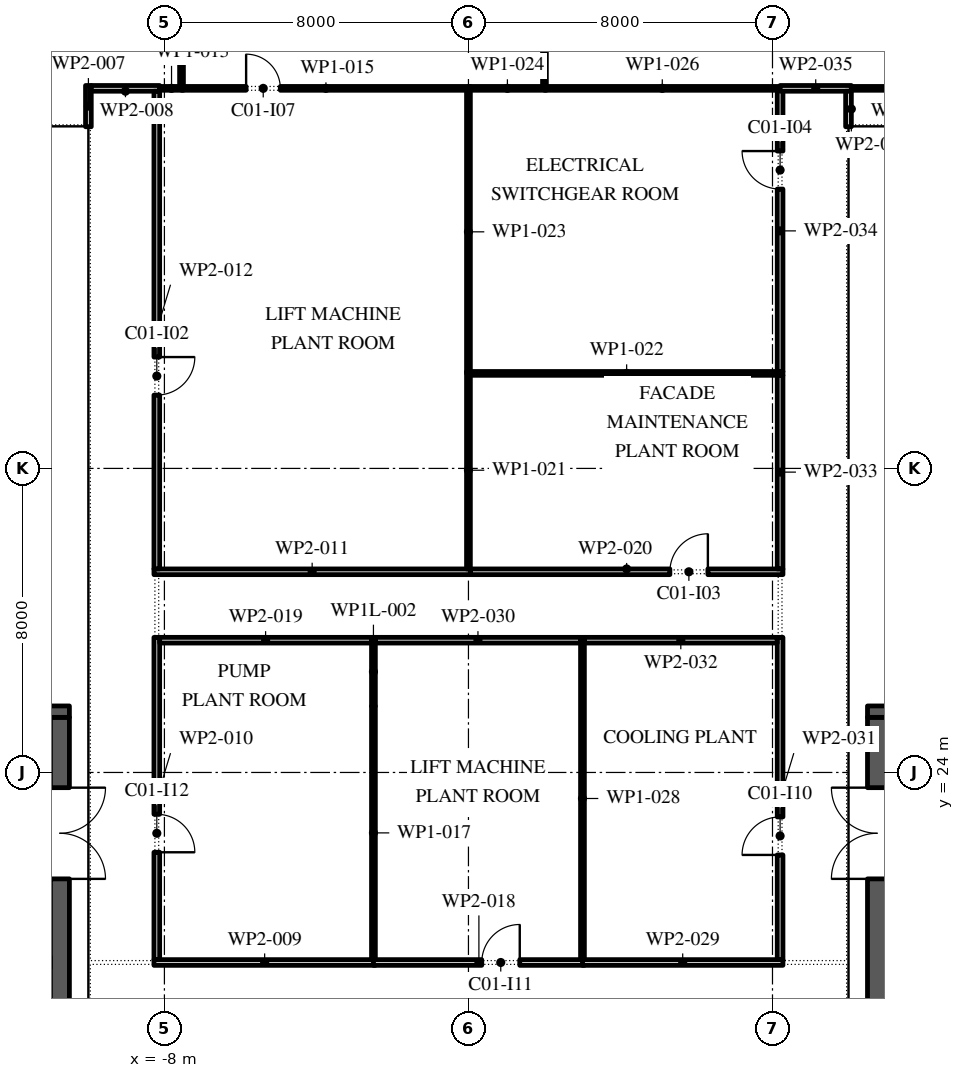
"""IFC4 building model, lengths in metres.
Left out: names, types, materials, properties, quantities, classifications, styles, units other than length and angle.
Written with IfcOpenShell. Run it as: python <this file> out.ifc"""

import sys

from ifc_helpers import new_model, si_unit, direction, frame, frame_2d, origin, place, context, subcontext, project, spatial, rectangle, extrude, element, fill, save


model = new_model("IFC4")
c1 = context("Model", 3, precision=1e-05, world=origin(), true_north=direction((0.0, 1.0)))
c2 = subcontext(c1, "Body", "Model", "MODEL_VIEW")
j1 = project(units=[si_unit("LENGTHUNIT", "METRE"), si_unit("PLANEANGLEUNIT", "RADIAN")], contexts=[c1])
p1 = place(None, origin())
s1 = spatial("IfcSite", under=j1, at=p1, CompositionType="ELEMENT")
p2 = place(p1, origin())
s2 = spatial("IfcBuilding", under=s1, at=p2, CompositionType="ELEMENT")
p3 = place(p2, frame((0.0, 0.0, 369.0)))
s3 = spatial("IfcBuildingStorey", under=s2, at=p3, CompositionType="ELEMENT", Elevation=369.0)
p4 = place(p3, frame((-10.75, -2.45, 0.0), z_axis=(0.0, 0.0, 1.0), x_axis=(0.0, 1.0, 0.0)))
e1 = element("IfcWall", 1, at=p4, inside=s3, PredefinedType="SHEAR", context=c2, shape_type="SweptSolid", body=[
    extrude(rectangle(XDim=27.9, YDim=0.5, at=frame_2d((13.95, 0.0))), origin(), (0.0, 0.0, 1.0), 4.0),
])
p5 = place(p4, frame((23.65, 0.0, 0.0)))
e2 = element("IfcOpeningElement", 2, at=p5, cuts=e1, PredefinedType="OPENING", context=c2, shape_type="SweptSolid", body=[
    extrude(rectangle(XDim=2.4, YDim=2.1, at=frame_2d((1.2, 1.05))), frame((0.0, 0.26, 0.0), z_axis=(0.0, -1.0, 0.0), x_axis=(1.0, 0.0, 0.0)), (0.0, 0.0, 1.0), 0.52),
])
p6 = place(p4, frame((1.387, 0.0, 0.0)))
e3 = element("IfcOpeningElement", 3, at=p6, cuts=e1, PredefinedType="OPENING", context=c2, shape_type="SweptSolid", body=[
    extrude(rectangle(XDim=0.9, YDim=2.1, at=frame_2d((0.45, 1.05))), frame((0.0, 0.26, 0.0), z_axis=(0.0, -1.0, 0.0), x_axis=(1.0, 0.0, 0.0)), (0.0, 0.0, 1.0), 0.52),
])
p7 = place(p4, frame((4.562, 0.0, 0.0)))
e4 = element("IfcOpeningElement", 4, at=p7, cuts=e1, PredefinedType="OPENING", context=c2, shape_type="SweptSolid", body=[
    extrude(rectangle(XDim=1.0, YDim=2.1, at=frame_2d((0.5, 1.05))), frame((0.0, 0.26, 0.0), z_axis=(0.0, -1.0, 0.0), x_axis=(1.0, 0.0, 0.0)), (0.0, 0.0, 1.0), 0.52),
])
p8 = place(p3, frame((-21.5, 25.6, 0.0), z_axis=(0.0, 0.0, 1.0), x_axis=(1.0, 0.0, 0.0)))
e5 = element("IfcWall", 5, at=p8, inside=s3, PredefinedType="SHEAR", context=c2, shape_type="SweptSolid", body=[
    extrude(rectangle(XDim=11.0, YDim=0.3, at=frame_2d((5.5, 0.0))), origin(), (0.0, 0.0, 1.0), 4.0),
])
p9 = place(p3, frame((10.75, -2.45, 0.0), z_axis=(0.0, 0.0, 1.0), x_axis=(0.0, 1.0, 0.0)))
e6 = element("IfcWall", 6, at=p9, inside=s3, PredefinedType="SHEAR", context=c2, shape_type="SweptSolid", body=[
    extrude(rectangle(XDim=27.9, YDim=0.5, at=frame_2d((13.95, 0.0))), origin(), (0.0, 0.0, 1.0), 4.0),
])
p10 = place(p9, frame((23.65, 0.0, 0.0)))
e7 = element("IfcOpeningElement", 7, at=p10, cuts=e6, PredefinedType="OPENING", context=c2, shape_type="SweptSolid", body=[
    extrude(rectangle(XDim=2.4, YDim=2.1, at=frame_2d((1.2, 1.05))), frame((0.0, 0.26, 0.0), z_axis=(0.0, -1.0, 0.0), x_axis=(1.0, 0.0, 0.0)), (0.0, 0.0, 1.0), 0.52),
])
p11 = place(p9, frame((0.788, 0.0, 0.0)))
e8 = element("IfcOpeningElement", 8, at=p11, cuts=e6, PredefinedType="OPENING", context=c2, shape_type="SweptSolid", body=[
    extrude(rectangle(XDim=0.9, YDim=2.1, at=frame_2d((0.45, 1.05))), frame((0.0, 0.26, 0.0), z_axis=(0.0, -1.0, 0.0), x_axis=(1.0, 0.0, 0.0)), (0.0, 0.0, 1.0), 0.52),
])
p12 = place(p9, frame((3.962, 0.0, 0.0)))
e9 = element("IfcOpeningElement", 9, at=p12, cuts=e6, PredefinedType="OPENING", context=c2, shape_type="SweptSolid", body=[
    extrude(rectangle(XDim=1.0, YDim=2.1, at=frame_2d((0.5, 1.05))), frame((0.0, 0.26, 0.0), z_axis=(0.0, -1.0, 0.0), x_axis=(1.0, 0.0, 0.0)), (0.0, 0.0, 1.0), 0.52),
])
p13 = place(p3, frame((10.5, 25.6, 0.0), z_axis=(0.0, 0.0, 1.0), x_axis=(1.0, 0.0, 0.0)))
e10 = element("IfcWall", 10, at=p13, inside=s3, PredefinedType="SHEAR", context=c2, shape_type="SweptSolid", body=[
    extrude(rectangle(XDim=11.0, YDim=0.3, at=frame_2d((5.5, 0.0))), origin(), (0.0, 0.0, 1.0), 4.0),
])
p14 = place(p3, frame((-10.0, 40.99, 0.0), z_axis=(0.0, 0.0, 1.0), x_axis=(0.0, 1.0, 0.0)))
e11 = element("IfcWall", 11, at=p14, inside=s3, PredefinedType="PARTITIONING", context=c2, shape_type="SweptSolid", body=[
    extrude(rectangle(XDim=1.085, YDim=0.15, at=frame_2d((0.542, 0.0))), origin(), (0.0, 0.0, 1.0), 4.0),
])
p15 = place(p3, frame((-9.925, 42.0, 0.0), z_axis=(0.0, 0.0, 1.0), x_axis=(1.0, 0.0, 0.0)))
e12 = element("IfcWall", 12, at=p15, inside=s3, PredefinedType="PARTITIONING", context=c2, shape_type="SweptSolid", body=[
    extrude(rectangle(XDim=1.8, YDim=0.15, at=frame_2d((0.9, 0.0))), origin(), (0.0, 0.0, 1.0), 4.0),
])
p16 = place(p3, frame((-8.275, 19.0, 0.0), z_axis=(0.0, 0.0, 1.0), x_axis=(1.0, 0.0, 0.0)))
e13 = element("IfcWall", 13, at=p16, inside=s3, PredefinedType="PARTITIONING", context=c2, shape_type="SweptSolid", body=[
    extrude(rectangle(XDim=5.825, YDim=0.15, at=frame_2d((2.913, 0.0))), origin(), (0.0, 0.0, 1.0), 4.0),
])
p17 = place(p3, frame((-8.2, 27.555, 0.0), z_axis=(0.0, 0.0, 1.0), x_axis=(0.0, -1.0, 0.0)))
e14 = element("IfcWall", 14, at=p17, inside=s3, PredefinedType="PARTITIONING", context=c2, shape_type="SweptSolid", body=[
    extrude(rectangle(XDim=8.48, YDim=0.15, at=frame_2d((4.24, 0.0))), origin(), (0.0, 0.0, 1.0), 4.0),
])
p18 = place(p17, frame((4.655, 0.0, 0.0)))
e15 = element("IfcOpeningElement", 15, at=p18, cuts=e14, PredefinedType="OPENING", context=c2, shape_type="SweptSolid", body=[
    extrude(rectangle(XDim=1.0, YDim=2.1, at=frame_2d((0.5, 1.05))), frame((0.0, 0.085, 0.0), z_axis=(0.0, -1.0, 0.0), x_axis=(1.0, 0.0, 0.0)), (0.0, 0.0, 1.0), 0.17),
])
p19 = place(p3, frame((-8.275, 29.28, 0.0), z_axis=(0.0, 0.0, 1.0), x_axis=(1.0, 0.0, 0.0)))
e16 = element("IfcWall", 16, at=p19, inside=s3, PredefinedType="PARTITIONING", context=c2, shape_type="SweptSolid", body=[
    extrude(rectangle(XDim=8.325, YDim=0.15, at=frame_2d((4.163, 0.0))), origin(), (0.0, 0.0, 1.0), 4.0),
])
p20 = place(p3, frame((-8.2, 41.925, 0.0), z_axis=(0.0, 0.0, 1.0), x_axis=(0.0, -1.0, 0.0)))
e17 = element("IfcWall", 17, at=p20, inside=s3, PredefinedType="PARTITIONING", context=c2, shape_type="SweptSolid", body=[
    extrude(rectangle(XDim=12.57, YDim=0.15, at=frame_2d((6.285, 0.0))), origin(), (0.0, 0.0, 1.0), 4.0),
])
p21 = place(p20, frame((6.995, 0.0, 0.0)))
e18 = element("IfcOpeningElement", 18, at=p21, cuts=e17, PredefinedType="OPENING", context=c2, shape_type="SweptSolid", body=[
    extrude(rectangle(XDim=1.0, YDim=2.1, at=frame_2d((0.5, 1.05))), frame((0.0, 0.085, 0.0), z_axis=(0.0, -1.0, 0.0), x_axis=(1.0, 0.0, 0.0)), (0.0, 0.0, 1.0), 0.17),
])
p22 = place(p3, frame((-8.125, 42.0, 0.0), z_axis=(0.0, 0.0, 1.0), x_axis=(1.0, 0.0, 0.0)))
e19 = element("IfcWall", 19, at=p22, inside=s3, PredefinedType="PARTITIONING", context=c2, shape_type="SweptSolid", body=[
    extrude(rectangle(XDim=0.625, YDim=0.1, at=frame_2d((0.312, 0.0))), origin(), (0.0, 0.0, 1.0), 4.0),
])
p23 = place(p3, frame((-7.55, 42.05, 0.0), z_axis=(0.0, 0.0, 1.0), x_axis=(0.0, 1.0, 0.0)))
e20 = element("IfcWall", 20, at=p23, inside=s3, PredefinedType="PARTITIONING", context=c2, shape_type="SweptSolid", body=[
    extrude(rectangle(XDim=7.4, YDim=0.1, at=frame_2d((3.7, 0.0))), origin(), (0.0, 0.0, 1.0), 4.0),
])
p24 = place(p3, frame((-7.55, 42.0, 0.0), z_axis=(0.0, 0.0, 1.0), x_axis=(1.0, 0.0, 0.0)))
e21 = element("IfcWall", 21, at=p24, inside=s3, PredefinedType="PARTITIONING", context=c2, shape_type="SweptSolid", body=[
    extrude(rectangle(XDim=7.6, YDim=0.1, at=frame_2d((3.8, 0.0))), origin(), (0.0, 0.0, 1.0), 4.0),
])
p25 = place(p24, frame((1.7, 0.0, 0.0)))
e22 = element("IfcOpeningElement", 22, at=p25, cuts=e21, PredefinedType="OPENING", context=c2, shape_type="SweptSolid", body=[
    extrude(rectangle(XDim=0.9, YDim=2.1, at=frame_2d((0.45, 1.05))), frame((0.0, 0.06, 0.0), z_axis=(0.0, -1.0, 0.0), x_axis=(1.0, 0.0, 0.0)), (0.0, 0.0, 1.0), 0.12),
])
p26 = place(p3, frame((-2.5, 19.075, 0.0), z_axis=(0.0, 0.0, 1.0), x_axis=(0.0, 1.0, 0.0)))
e23 = element("IfcWall", 23, at=p26, inside=s3, PredefinedType="PARTITIONING", context=c2, shape_type="SweptSolid", body=[
    extrude(rectangle(XDim=6.67, YDim=0.1, at=frame_2d((3.335, 0.0))), origin(), (0.0, 0.0, 1.0), 4.0),
])
p27 = place(p3, frame((-2.5, 19.0, 0.0), z_axis=(0.0, 0.0, 1.0), x_axis=(1.0, 0.0, 0.0)))
e24 = element("IfcWall", 24, at=p27, inside=s3, PredefinedType="PARTITIONING", context=c2, shape_type="SweptSolid", body=[
    extrude(rectangle(XDim=5.55, YDim=0.15, at=frame_2d((2.775, 0.0))), origin(), (0.0, 0.0, 1.0), 4.0),
])
p28 = place(p27, frame((2.85, 0.0, 0.0)))
e25 = element("IfcOpeningElement", 25, at=p28, cuts=e24, PredefinedType="OPENING", context=c2, shape_type="SweptSolid", body=[
    extrude(rectangle(XDim=1.0, YDim=2.1, at=frame_2d((0.5, 1.05))), frame((0.0, 0.085, 0.0), z_axis=(0.0, -1.0, 0.0), x_axis=(1.0, 0.0, 0.0)), (0.0, 0.0, 1.0), 0.17),
])
p29 = place(p3, frame((-2.55, 27.48, 0.0), z_axis=(0.0, 0.0, 1.0), x_axis=(-1.0, 0.0, 0.0)))
e26 = element("IfcWall", 26, at=p29, inside=s3, PredefinedType="PARTITIONING", context=c2, shape_type="SweptSolid", body=[
    extrude(rectangle(XDim=5.575, YDim=0.15, at=frame_2d((2.788, 0.0))), origin(), (0.0, 0.0, 1.0), 4.0),
])
p30 = place(p3, frame((0.05, 29.28, 0.0), z_axis=(0.0, 0.0, 1.0), x_axis=(1.0, 0.0, 0.0)))
e27 = element("IfcWall", 27, at=p30, inside=s3, PredefinedType="PARTITIONING", context=c2, shape_type="SweptSolid", body=[
    extrude(rectangle(XDim=8.225, YDim=0.15, at=frame_2d((4.112, 0.0))), origin(), (0.0, 0.0, 1.0), 4.0),
])
p31 = place(p30, frame((5.25, 0.0, 0.0)))
e28 = element("IfcOpeningElement", 28, at=p31, cuts=e27, PredefinedType="OPENING", context=c2, shape_type="SweptSolid", body=[
    extrude(rectangle(XDim=1.0, YDim=2.1, at=frame_2d((0.5, 1.05))), frame((0.0, 0.085, 0.0), z_axis=(0.0, -1.0, 0.0), x_axis=(1.0, 0.0, 0.0)), (0.0, 0.0, 1.0), 0.17),
])
p32 = place(p3, frame((0.0, 34.55, 0.0), z_axis=(0.0, 0.0, 1.0), x_axis=(0.0, -1.0, 0.0)))
e29 = element("IfcWall", 29, at=p32, inside=s3, PredefinedType="PARTITIONING", context=c2, shape_type="SweptSolid", body=[
    extrude(rectangle(XDim=5.195, YDim=0.1, at=frame_2d((2.598, 0.0))), origin(), (0.0, 0.0, 1.0), 4.0),
])
p33 = place(p3, frame((0.05, 34.5, 0.0), z_axis=(0.0, 0.0, 1.0), x_axis=(1.0, 0.0, 0.0)))
e30 = element("IfcWall", 30, at=p33, inside=s3, PredefinedType="PARTITIONING", context=c2, shape_type="SweptSolid", body=[
    extrude(rectangle(XDim=8.225, YDim=0.1, at=frame_2d((4.112, 0.0))), origin(), (0.0, 0.0, 1.0), 4.0),
])
p34 = place(p3, frame((0.0, 41.95, 0.0), z_axis=(0.0, 0.0, 1.0), x_axis=(0.0, -1.0, 0.0)))
e31 = element("IfcWall", 31, at=p34, inside=s3, PredefinedType="PARTITIONING", context=c2, shape_type="SweptSolid", body=[
    extrude(rectangle(XDim=7.45, YDim=0.1, at=frame_2d((3.725, 0.0))), origin(), (0.0, 0.0, 1.0), 4.0),
])
p35 = place(p3, frame((0.0, 42.0, 0.0), z_axis=(0.0, 0.0, 1.0), x_axis=(1.0, 0.0, 0.0)))
e32 = element("IfcWall", 32, at=p35, inside=s3, PredefinedType="PARTITIONING", context=c2, shape_type="SweptSolid", body=[
    extrude(rectangle(XDim=2.05, YDim=0.1, at=frame_2d((1.025, 0.0))), origin(), (0.0, 0.0, 1.0), 4.0),
])
p36 = place(p3, frame((2.0, 42.05, 0.0), z_axis=(0.0, 0.0, 1.0), x_axis=(0.0, 1.0, 0.0)))
e33 = element("IfcWall", 33, at=p36, inside=s3, PredefinedType="PARTITIONING", context=c2, shape_type="SweptSolid", body=[
    extrude(rectangle(XDim=7.4, YDim=0.1, at=frame_2d((3.7, 0.0))), origin(), (0.0, 0.0, 1.0), 4.0),
])
p37 = place(p3, frame((2.0, 42.0, 0.0), z_axis=(0.0, 0.0, 1.0), x_axis=(1.0, 0.0, 0.0)))
e34 = element("IfcWall", 34, at=p37, inside=s3, PredefinedType="PARTITIONING", context=c2, shape_type="SweptSolid", body=[
    extrude(rectangle(XDim=6.2, YDim=0.1, at=frame_2d((3.1, 0.0))), origin(), (0.0, 0.0, 1.0), 4.0),
])
p38 = place(p3, frame((3.0, 19.075, 0.0), z_axis=(0.0, 0.0, 1.0), x_axis=(0.0, 1.0, 0.0)))
e35 = element("IfcWall", 35, at=p38, inside=s3, PredefinedType="PARTITIONING", context=c2, shape_type="SweptSolid", body=[
    extrude(rectangle(XDim=8.48, YDim=0.1, at=frame_2d((4.24, 0.0))), origin(), (0.0, 0.0, 1.0), 4.0),
])
p39 = place(p3, frame((3.0, 19.0, 0.0), z_axis=(0.0, 0.0, 1.0), x_axis=(1.0, 0.0, 0.0)))
e36 = element("IfcWall", 36, at=p39, inside=s3, PredefinedType="PARTITIONING", context=c2, shape_type="SweptSolid", body=[
    extrude(rectangle(XDim=5.275, YDim=0.15, at=frame_2d((2.637, 0.0))), origin(), (0.0, 0.0, 1.0), 4.0),
])
p40 = place(p3, frame((2.95, 27.48, 0.0), z_axis=(0.0, 0.0, 1.0), x_axis=(-1.0, 0.0, 0.0)))
e37 = element("IfcWall", 37, at=p40, inside=s3, PredefinedType="PARTITIONING", context=c2, shape_type="SweptSolid", body=[
    extrude(rectangle(XDim=5.4, YDim=0.15, at=frame_2d((2.7, 0.0))), origin(), (0.0, 0.0, 1.0), 4.0),
])
p41 = place(p3, frame((8.2, 19.075, 0.0), z_axis=(0.0, 0.0, 1.0), x_axis=(0.0, 1.0, 0.0)))
e38 = element("IfcWall", 38, at=p41, inside=s3, PredefinedType="PARTITIONING", context=c2, shape_type="SweptSolid", body=[
    extrude(rectangle(XDim=8.48, YDim=0.15, at=frame_2d((4.24, 0.0))), origin(), (0.0, 0.0, 1.0), 4.0),
])
p42 = place(p41, frame((2.755, 0.0, 0.0)))
e39 = element("IfcOpeningElement", 39, at=p42, cuts=e38, PredefinedType="OPENING", context=c2, shape_type="SweptSolid", body=[
    extrude(rectangle(XDim=1.0, YDim=2.1, at=frame_2d((0.5, 1.05))), frame((0.0, 0.085, 0.0), z_axis=(0.0, -1.0, 0.0), x_axis=(1.0, 0.0, 0.0)), (0.0, 0.0, 1.0), 0.17),
])
p43 = place(p3, frame((8.125, 27.48, 0.0), z_axis=(0.0, 0.0, 1.0), x_axis=(-1.0, 0.0, 0.0)))
e40 = element("IfcWall", 40, at=p43, inside=s3, PredefinedType="PARTITIONING", context=c2, shape_type="SweptSolid", body=[
    extrude(rectangle(XDim=5.075, YDim=0.15, at=frame_2d((2.538, 0.0))), origin(), (0.0, 0.0, 1.0), 4.0),
])
p44 = place(p3, frame((8.2, 29.355, 0.0), z_axis=(0.0, 0.0, 1.0), x_axis=(0.0, 1.0, 0.0)))
e41 = element("IfcWall", 41, at=p44, inside=s3, PredefinedType="PARTITIONING", context=c2, shape_type="SweptSolid", body=[
    extrude(rectangle(XDim=5.095, YDim=0.15, at=frame_2d((2.547, 0.0))), origin(), (0.0, 0.0, 1.0), 4.0),
])
p45 = place(p3, frame((8.2, 34.55, 0.0), z_axis=(0.0, 0.0, 1.0), x_axis=(0.0, 1.0, 0.0)))
e42 = element("IfcWall", 42, at=p45, inside=s3, PredefinedType="PARTITIONING", context=c2, shape_type="SweptSolid", body=[
    extrude(rectangle(XDim=7.4, YDim=0.15, at=frame_2d((3.7, 0.0))), origin(), (0.0, 0.0, 1.0), 4.0),
])
p46 = place(p45, frame((4.8, 0.0, 0.0)))
e43 = element("IfcOpeningElement", 43, at=p46, cuts=e42, PredefinedType="OPENING", context=c2, shape_type="SweptSolid", body=[
    extrude(rectangle(XDim=1.0, YDim=2.1, at=frame_2d((0.5, 1.05))), frame((0.0, 0.085, 0.0), z_axis=(0.0, -1.0, 0.0), x_axis=(1.0, 0.0, 0.0)), (0.0, 0.0, 1.0), 0.17),
])
p47 = place(p3, frame((8.2, 42.0, 0.0), z_axis=(0.0, 0.0, 1.0), x_axis=(1.0, 0.0, 0.0)))
e44 = element("IfcWall", 44, at=p47, inside=s3, PredefinedType="PARTITIONING", context=c2, shape_type="SweptSolid", body=[
    extrude(rectangle(XDim=1.875, YDim=0.15, at=frame_2d((0.938, 0.0))), origin(), (0.0, 0.0, 1.0), 4.0),
])
p48 = place(p3, frame((10.0, 41.925, 0.0), z_axis=(0.0, 0.0, 1.0), x_axis=(0.0, -1.0, 0.0)))
e45 = element("IfcWall", 45, at=p48, inside=s3, PredefinedType="PARTITIONING", context=c2, shape_type="SweptSolid", body=[
    extrude(rectangle(XDim=0.935, YDim=0.15, at=frame_2d((0.468, 0.0))), origin(), (0.0, 0.0, 1.0), 4.0),
])
p49 = place(p3, frame((10.075, 42.0, 0.0), z_axis=(0.0, 0.0, 1.0), x_axis=(1.0, 0.0, 0.0)))
e46 = element("IfcWall", 46, at=p49, inside=s3, PredefinedType="PARTITIONING", context=c2, shape_type="SweptSolid", body=[
    extrude(rectangle(XDim=2.975, YDim=0.1, at=frame_2d((1.488, 0.0))), origin(), (0.0, 0.0, 1.0), 4.0),
])
p50 = place(p3, frame((-2.5, 25.745, 0.0), z_axis=(0.0, 0.0, 1.0), x_axis=(0.0, 1.0, 0.0)))
e47 = element("IfcWall", 47, at=p50, inside=s3, PredefinedType="PARTITIONING", context=c2, shape_type="SweptSolid", body=[
    extrude(rectangle(XDim=1.81, YDim=0.1, at=frame_2d((0.905, 0.0))), origin(), (0.0, 0.0, 1.0), 3.02),
])
p51 = place(p5, frame((2.4, 0.0, 0.0), z_axis=(0.0, 0.0, 1.0), x_axis=(-1.0, 0.0, 0.0)))
e48 = element("IfcDoor", 48, at=p51, inside=s3, OperationType="DOUBLE_DOOR_SINGLE_SWING", PredefinedType="DOOR", context=c2, shape_type="SweptSolid", body=[
    extrude(rectangle(XDim=2.4, YDim=2.1, at=frame_2d((1.2, 1.05))), frame((0.0, 0.025, 0.0), z_axis=(0.0, -1.0, 0.0), x_axis=(1.0, 0.0, 0.0)), (0.0, 0.0, 1.0), 0.05),
])
fill(e2, e48)
p52 = place(p10, origin())
e49 = element("IfcDoor", 49, at=p52, inside=s3, OperationType="DOUBLE_DOOR_SINGLE_SWING", PredefinedType="DOOR", context=c2, shape_type="SweptSolid", body=[
    extrude(rectangle(XDim=2.4, YDim=2.1, at=frame_2d((1.2, 1.05))), frame((0.0, 0.025, 0.0), z_axis=(0.0, -1.0, 0.0), x_axis=(1.0, 0.0, 0.0)), (0.0, 0.0, 1.0), 0.05),
])
fill(e7, e49)
p53 = place(p21, origin())
e50 = element("IfcDoor", 50, at=p53, inside=s3, OperationType="SINGLE_SWING_RIGHT", PredefinedType="DOOR", context=c2, shape_type="SweptSolid", body=[
    extrude(rectangle(XDim=1.0, YDim=2.1, at=frame_2d((0.5, 1.05))), frame((0.0, 0.025, 0.0), z_axis=(0.0, -1.0, 0.0), x_axis=(1.0, 0.0, 0.0)), (0.0, 0.0, 1.0), 0.05),
])
fill(e18, e50)
p54 = place(p31, origin())
e51 = element("IfcDoor", 51, at=p54, inside=s3, OperationType="SINGLE_SWING_LEFT", PredefinedType="DOOR", context=c2, shape_type="SweptSolid", body=[
    extrude(rectangle(XDim=1.0, YDim=2.1, at=frame_2d((0.5, 1.05))), frame((0.0, 0.025, 0.0), z_axis=(0.0, -1.0, 0.0), x_axis=(1.0, 0.0, 0.0)), (0.0, 0.0, 1.0), 0.05),
])
fill(e28, e51)
p55 = place(p46, origin())
e52 = element("IfcDoor", 52, at=p55, inside=s3, OperationType="SINGLE_SWING_LEFT", PredefinedType="DOOR", context=c2, shape_type="SweptSolid", body=[
    extrude(rectangle(XDim=1.0, YDim=2.1, at=frame_2d((0.5, 1.05))), frame((0.0, 0.025, 0.0), z_axis=(0.0, -1.0, 0.0), x_axis=(1.0, 0.0, 0.0)), (0.0, 0.0, 1.0), 0.05),
])
fill(e43, e52)
p56 = place(p25, origin())
e53 = element("IfcDoor", 53, at=p56, inside=s3, OperationType="SINGLE_SWING_RIGHT", PredefinedType="DOOR", context=c2, shape_type="SweptSolid", body=[
    extrude(rectangle(XDim=0.9, YDim=2.1, at=frame_2d((0.45, 1.05))), frame((0.0, 0.025, 0.0), z_axis=(0.0, -1.0, 0.0), x_axis=(1.0, 0.0, 0.0)), (0.0, 0.0, 1.0), 0.05),
])
fill(e22, e53)
p57 = place(p42, origin())
e54 = element("IfcDoor", 54, at=p57, inside=s3, OperationType="SINGLE_SWING_RIGHT", PredefinedType="DOOR", context=c2, shape_type="SweptSolid", body=[
    extrude(rectangle(XDim=1.0, YDim=2.1, at=frame_2d((0.5, 1.05))), frame((0.0, 0.025, 0.0), z_axis=(0.0, -1.0, 0.0), x_axis=(1.0, 0.0, 0.0)), (0.0, 0.0, 1.0), 0.05),
])
fill(e39, e54)
p58 = place(p28, origin())
e55 = element("IfcDoor", 55, at=p58, inside=s3, OperationType="SINGLE_SWING_LEFT", PredefinedType="DOOR", context=c2, shape_type="SweptSolid", body=[
    extrude(rectangle(XDim=1.0, YDim=2.1, at=frame_2d((0.5, 1.05))), frame((0.0, 0.025, 0.0), z_axis=(0.0, -1.0, 0.0), x_axis=(1.0, 0.0, 0.0)), (0.0, 0.0, 1.0), 0.05),
])
fill(e25, e55)
p59 = place(p18, origin())
e56 = element("IfcDoor", 56, at=p59, inside=s3, OperationType="SINGLE_SWING_LEFT", PredefinedType="DOOR", context=c2, shape_type="SweptSolid", body=[
    extrude(rectangle(XDim=1.0, YDim=2.1, at=frame_2d((0.5, 1.05))), frame((0.0, 0.025, 0.0), z_axis=(0.0, -1.0, 0.0), x_axis=(1.0, 0.0, 0.0)), (0.0, 0.0, 1.0), 0.05),
])
fill(e15, e56)
save(model, sys.argv[1])
